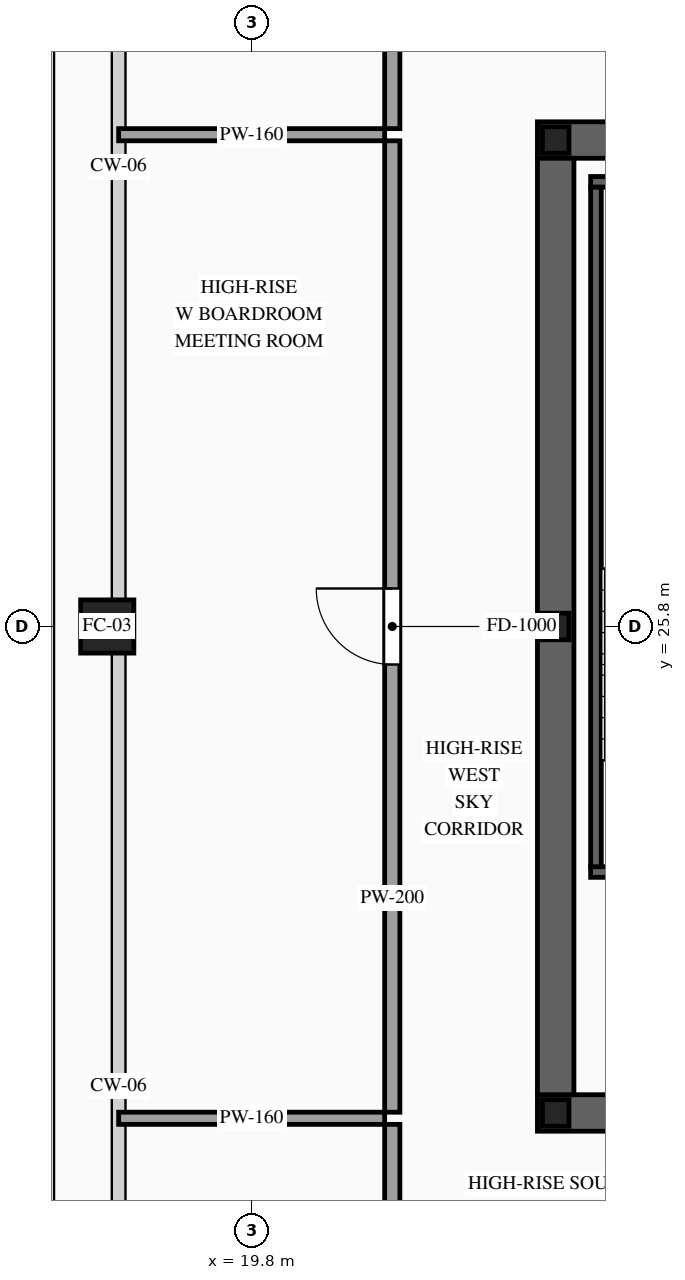
"""IFC4 building model, lengths in metres.
Left out: names, types, materials, properties, quantities, classifications, styles, units other than length and angle.
Written with IfcOpenShell. Run it as: python <this file> out.ifc"""

import sys

from ifc_helpers import new_model, si_unit, direction, frame, frame_2d, origin, origin_2d, place, context, subcontext, project, spatial, rectangle, hollow_rectangle, i_section, extrude, source, transform, mapped, element, fill, save


model = new_model("IFC4")
c1 = context("Model", 3, precision=1e-05, world=origin(), true_north=direction((0.0, 1.0)))
c2 = subcontext(c1, "Body", "Model", "MODEL_VIEW")
j1 = project(units=[si_unit("LENGTHUNIT", "METRE"), si_unit("PLANEANGLEUNIT", "RADIAN")], contexts=[c1])
p1 = place(None, origin())
s1 = spatial("IfcSite", under=j1, at=p1, CompositionType="ELEMENT")
p2 = place(p1, origin())
s2 = spatial("IfcBuilding", under=s1, at=p2, CompositionType="ELEMENT")
p3 = place(p2, frame((0.0, 0.0, 328.7)))
s3 = spatial("IfcBuildingStorey", under=s2, at=p3, CompositionType="ELEMENT", Elevation=328.7)
p4 = place(p3, frame((23.56, 19.4, 0.0), z_axis=(0.0, 0.0, 1.0), x_axis=(1.0, 0.0, 0.0)))
e1 = element("IfcWall", 1, at=p4, inside=s3, PredefinedType="SHEAR", context=c2, shape_type="SweptSolid", body=[
    extrude(rectangle(XDim=26.88, YDim=0.48, at=frame_2d((13.44, 0.0))), origin(), (0.0, 0.0, 1.0), 3.5),
])
p5 = place(p4, frame((1.89, 0.0, 0.0)))
e2 = element("IfcOpeningElement", 2, at=p5, cuts=e1, PredefinedType="OPENING", context=c2, shape_type="SweptSolid", body=[
    extrude(rectangle(XDim=1.1, YDim=2.2, at=frame_2d((0.55, 1.1))), frame((0.0, 0.255, 0.0), z_axis=(0.0, -1.0, 0.0), x_axis=(1.0, 0.0, 0.0)), (0.0, 0.0, 1.0), 0.51),
])
p6 = place(p4, frame((9.79, 0.0, 0.0)))
e3 = element("IfcOpeningElement", 3, at=p6, cuts=e1, PredefinedType="OPENING", context=c2, shape_type="SweptSolid", body=[
    extrude(rectangle(XDim=1.1, YDim=2.2, at=frame_2d((0.55, 1.1))), frame((0.0, 0.255, 0.0), z_axis=(0.0, -1.0, 0.0), x_axis=(1.0, 0.0, 0.0)), (0.0, 0.0, 1.0), 0.51),
])
p7 = place(p4, frame((22.99, 0.0, 0.0)))
e4 = element("IfcOpeningElement", 4, at=p7, cuts=e1, PredefinedType="OPENING", context=c2, shape_type="SweptSolid", body=[
    extrude(rectangle(XDim=1.1, YDim=2.2, at=frame_2d((0.55, 1.1))), frame((0.0, 0.255, 0.0), z_axis=(0.0, -1.0, 0.0), x_axis=(1.0, 0.0, 0.0)), (0.0, 0.0, 1.0), 0.51),
])
p8 = place(p4, frame((19.61, 0.0, 0.0)))
e5 = element("IfcOpeningElement", 5, at=p8, cuts=e1, PredefinedType="OPENING", context=c2, shape_type="SweptSolid", body=[
    extrude(rectangle(XDim=0.9, YDim=2.15, at=frame_2d((0.45, 1.075))), frame((0.0, 0.255, 0.0), z_axis=(0.0, -1.0, 0.0), x_axis=(1.0, 0.0, 0.0)), (0.0, 0.0, 1.0), 0.51),
])
p9 = place(p4, frame((18.17, 0.0, 0.0)))
e6 = element("IfcOpeningElement", 6, at=p9, cuts=e1, PredefinedType="OPENING", context=c2, shape_type="SweptSolid", body=[
    extrude(rectangle(XDim=0.9, YDim=2.15, at=frame_2d((0.45, 1.075))), frame((0.0, 0.255, 0.0), z_axis=(0.0, -1.0, 0.0), x_axis=(1.0, 0.0, 0.0)), (0.0, 0.0, 1.0), 0.51),
])
p10 = place(p3, frame((23.56, 32.2, 0.0), z_axis=(0.0, 0.0, 1.0), x_axis=(1.0, 0.0, 0.0)))
e7 = element("IfcWall", 7, at=p10, inside=s3, PredefinedType="SHEAR", context=c2, shape_type="SweptSolid", body=[
    extrude(rectangle(XDim=26.88, YDim=0.48, at=frame_2d((13.44, 0.0))), origin(), (0.0, 0.0, 1.0), 3.5),
])
p11 = place(p10, frame((4.51, 0.0, 0.0)))
e8 = element("IfcOpeningElement", 8, at=p11, cuts=e7, PredefinedType="OPENING", context=c2, shape_type="SweptSolid", body=[
    extrude(rectangle(XDim=0.9, YDim=2.15, at=frame_2d((0.45, 1.075))), frame((0.0, 0.255, 0.0), z_axis=(0.0, -1.0, 0.0), x_axis=(1.0, 0.0, 0.0)), (0.0, 0.0, 1.0), 0.51),
])
p12 = place(p10, frame((9.79, 0.0, 0.0)))
e9 = element("IfcOpeningElement", 9, at=p12, cuts=e7, PredefinedType="OPENING", context=c2, shape_type="SweptSolid", body=[
    extrude(rectangle(XDim=1.1, YDim=2.2, at=frame_2d((0.55, 1.1))), frame((0.0, 0.255, 0.0), z_axis=(0.0, -1.0, 0.0), x_axis=(1.0, 0.0, 0.0)), (0.0, 0.0, 1.0), 0.51),
])
p13 = place(p10, frame((15.64, 0.0, 0.0)))
e10 = element("IfcOpeningElement", 10, at=p13, cuts=e7, PredefinedType="OPENING", context=c2, shape_type="SweptSolid", body=[
    extrude(rectangle(XDim=1.1, YDim=2.2, at=frame_2d((0.55, 1.1))), frame((0.0, 0.255, 0.0), z_axis=(0.0, -1.0, 0.0), x_axis=(1.0, 0.0, 0.0)), (0.0, 0.0, 1.0), 0.51),
])
p14 = place(p10, frame((18.74, 0.0, 0.0)))
e11 = element("IfcOpeningElement", 11, at=p14, cuts=e7, PredefinedType="OPENING", context=c2, shape_type="SweptSolid", body=[
    extrude(rectangle(XDim=1.1, YDim=2.2, at=frame_2d((0.55, 1.1))), frame((0.0, 0.255, 0.0), z_axis=(0.0, -1.0, 0.0), x_axis=(1.0, 0.0, 0.0)), (0.0, 0.0, 1.0), 0.51),
])
m1 = source(origin(), c2, "Body", "SweptSolid", [
    extrude(rectangle(XDim=12.32, YDim=0.48, at=frame_2d((6.16, 0.0))), origin(), (0.0, 0.0, 1.0), 3.5),
])
p15 = place(p3, frame((23.8, 19.64, 0.0), z_axis=(0.0, 0.0, 1.0), x_axis=(0.0, 1.0, 0.0)))
e12 = element("IfcWall", 12, at=p15, inside=s3, PredefinedType="SHEAR", context=c2, shape_type="MappedRepresentation", body=[
    mapped(m1, transform((0.0, 0.0, 0.0), scale=1.0)),
])
m2 = source(origin(), c2, "Body", "SweptSolid", [
    extrude(i_section(OverallWidth=0.35, OverallDepth=0.35, WebThickness=0.012, FlangeThickness=0.019, at=origin_2d()), origin(), (0.0, 0.0, 1.0), 3.5),
])
for number, where, z_axis, x_axis in (
    (13, (23.8, 19.4, 0.0), (0.0, 0.0, 1.0), (1.0, 0.0, 0.0)),
    (14, (23.8, 25.8, 0.0), (0.0, 0.0, 1.0), (1.0, 0.0, 0.0)),
    (15, (23.8, 32.2, 0.0), (0.0, 0.0, 1.0), (1.0, 0.0, 0.0)),
):
    element("IfcColumn", number, at=place(p3, frame(where, z_axis=z_axis, x_axis=x_axis)), inside=s3, PredefinedType="COLUMN", context=c2, shape_type="MappedRepresentation", body=[
        mapped(m2, transform((0.0, 0.0, 0.0), scale=1.0)),
    ])
m3 = source(origin(), c2, "Body", "SweptSolid", [
    extrude(hollow_rectangle(XDim=0.7, YDim=0.7, WallThickness=0.032, at=origin_2d()), origin(), (0.0, 0.0, 1.0), 3.5),
])
p16 = place(p3, frame((17.9, 25.8, 0.0), z_axis=(0.0, 0.0, 1.0), x_axis=(1.0, 0.0, 0.0)))
e16 = element("IfcColumn", 16, at=p16, inside=s3, PredefinedType="COLUMN", context=c2, shape_type="MappedRepresentation", body=[
    mapped(m3, transform((0.0, 0.0, 0.0), scale=1.0)),
])
p17 = place(p3, frame((24.26, 22.57, 0.0), z_axis=(0.0, 0.0, 1.0), x_axis=(1.0, 0.0, 0.0)))
e17 = element("IfcWall", 17, at=p17, inside=s3, PredefinedType="SOLIDWALL", context=c2, shape_type="SweptSolid", body=[
    extrude(rectangle(XDim=3.28, YDim=0.14, at=frame_2d((1.64, 0.0))), origin(), (0.0, 0.0, 1.0), 3.28),
])
p18 = place(p17, frame((1.09, 0.0, 0.0)))
e18 = element("IfcOpeningElement", 18, at=p18, cuts=e17, PredefinedType="OPENING", context=c2, shape_type="SweptSolid", body=[
    extrude(rectangle(XDim=1.1, YDim=2.2, at=frame_2d((0.55, 1.1))), frame((0.0, 0.085, 0.0), z_axis=(0.0, -1.0, 0.0), x_axis=(1.0, 0.0, 0.0)), (0.0, 0.0, 1.0), 0.17),
])
m4 = source(origin(), c2, "Body", "SweptSolid", [
    extrude(rectangle(XDim=3.28, YDim=0.14, at=frame_2d((1.64, 0.0))), origin(), (0.0, 0.0, 1.0), 3.28),
])
p19 = place(p3, frame((24.26, 31.65, 0.0), z_axis=(0.0, 0.0, 1.0), x_axis=(1.0, 0.0, 0.0)))
e19 = element("IfcWall", 19, at=p19, inside=s3, PredefinedType="SOLIDWALL", context=c2, shape_type="MappedRepresentation", body=[
    mapped(m4, transform((0.0, 0.0, 0.0), scale=1.0)),
])
m5 = source(origin(), c2, "Body", "SweptSolid", [
    extrude(rectangle(XDim=8.94, YDim=0.14, at=frame_2d((4.47, 0.0))), origin(), (0.0, 0.0, 1.0), 3.28),
])
p20 = place(p3, frame((24.33, 22.64, 0.0), z_axis=(0.0, 0.0, 1.0), x_axis=(0.0, 1.0, 0.0)))
e20 = element("IfcWall", 20, at=p20, inside=s3, PredefinedType="SOLIDWALL", context=c2, shape_type="MappedRepresentation", body=[
    mapped(m5, transform((0.0, 0.0, 0.0), scale=1.0)),
])
m6 = source(origin(), c2, "Body", "SweptSolid", [
    extrude(rectangle(XDim=1.7, YDim=0.2, at=frame_2d((0.85, 0.0))), origin(), (0.0, 0.0, 1.0), 3.28),
])
for number, where, z_axis, x_axis in (
    (21, (21.65, 32.35, 0.0), (0.0, 0.0, 1.0), (0.0, 1.0, 0.0)),
    (22, (21.65, 17.55, 0.0), (0.0, 0.0, 1.0), (0.0, 1.0, 0.0)),
):
    element("IfcWall", number, at=place(p3, frame(where, z_axis=z_axis, x_axis=x_axis)), inside=s3, PredefinedType="PARTITIONING", context=c2, shape_type="MappedRepresentation", body=[
        mapped(m6, transform((0.0, 0.0, 0.0), scale=1.0)),
    ])
p21 = place(p3, frame((21.65, 19.41, 0.0), z_axis=(0.0, 0.0, 1.0), x_axis=(0.0, 1.0, 0.0)))
e23 = element("IfcWall", 23, at=p21, inside=s3, PredefinedType="PARTITIONING", context=c2, shape_type="SweptSolid", body=[
    extrude(rectangle(XDim=12.78, YDim=0.2, at=frame_2d((6.39, 0.0))), origin(), (0.0, 0.0, 1.0), 3.28),
])
p22 = place(p21, frame((5.89, 0.0, 0.0)))
e24 = element("IfcOpeningElement", 24, at=p22, cuts=e23, PredefinedType="OPENING", context=c2, shape_type="SweptSolid", body=[
    extrude(rectangle(XDim=1.0, YDim=2.2, at=frame_2d((0.5, 1.1))), frame((0.0, 0.115, 0.0), z_axis=(0.0, -1.0, 0.0), x_axis=(1.0, 0.0, 0.0)), (0.0, 0.0, 1.0), 0.23),
])
m7 = source(origin(), c2, "Body", "SweptSolid", [
    extrude(rectangle(XDim=3.5, YDim=0.16, at=frame_2d((1.75, 0.0))), origin(), (0.0, 0.0, 1.0), 2.825),
])
for number, where, z_axis, x_axis in (
    (25, (18.05, 19.33, 0.0), (0.0, 0.0, 1.0), (1.0, 0.0, 0.0)),
    (26, (18.05, 32.27, 0.0), (0.0, 0.0, 1.0), (1.0, 0.0, 0.0)),
):
    element("IfcWall", number, at=place(p3, frame(where, z_axis=z_axis, x_axis=x_axis)), inside=s3, PredefinedType="PARTITIONING", context=c2, shape_type="MappedRepresentation", body=[
        mapped(m7, transform((0.0, 0.0, 0.0), scale=1.0)),
    ])
m8 = source(origin(), c2, "Body", "SweptSolid", [
    extrude(rectangle(XDim=1.0, YDim=2.2, at=frame_2d((0.5, 1.1))), frame((0.0, 0.025, 0.0), z_axis=(0.0, -1.0, 0.0), x_axis=(1.0, 0.0, 0.0)), (0.0, 0.0, 1.0), 0.05),
])
p23 = place(p22, origin())
e27 = element("IfcDoor", 27, at=p23, inside=s3, OperationType="SINGLE_SWING_RIGHT", PredefinedType="DOOR", context=c2, shape_type="MappedRepresentation", body=[
    mapped(m8, transform((0.0, 0.0, 0.0), scale=1.0)),
])
fill(e24, e27)
save(model, sys.argv[1])
